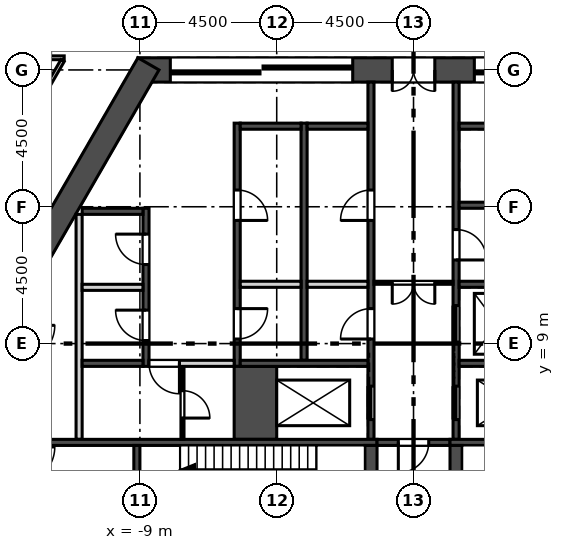
"""IFC4 building model, lengths in metres.
Left out: names, types, materials, properties, quantities, classifications, styles, units other than length and angle.
Written with IfcOpenShell. Run it as: python <this file> out.ifc"""

import sys

from ifc_helpers import new_model, si_unit, direction, frame, frame_2d, origin, place, context, subcontext, project, spatial, rectangle, extrude, element, fill, save


model = new_model("IFC4")
c1 = context("Model", 3, precision=1e-05, world=origin(), true_north=direction((0.0, 1.0)))
c2 = subcontext(c1, "Body", "Model", "MODEL_VIEW")
j1 = project(units=[si_unit("LENGTHUNIT", "METRE"), si_unit("PLANEANGLEUNIT", "RADIAN")], contexts=[c1])
p1 = place(None, origin())
s1 = spatial("IfcSite", under=j1, at=p1, CompositionType="ELEMENT")
p2 = place(p1, origin())
s2 = spatial("IfcBuilding", under=s1, at=p2, CompositionType="ELEMENT")
p3 = place(p2, frame((0.0, 0.0, 339.3)))
s3 = spatial("IfcBuildingStorey", under=s2, at=p3, CompositionType="ELEMENT", Elevation=339.3)
p4 = place(p3, frame((9.065, 18.0, 0.0), z_axis=(0.0, 0.0, 1.0), x_axis=(-1.0, 0.0, 0.0)))
e1 = element("IfcWall", 1, at=p4, inside=s3, PredefinedType="SHEAR", context=c2, shape_type="SweptSolid", body=[
    extrude(rectangle(XDim=18.13, YDim=0.8, at=frame_2d((9.065, 0.0))), origin(), (0.0, 0.0, 1.0), 5.4),
])
p5 = place(p4, frame((8.365, 0.0, 0.0)))
e2 = element("IfcOpeningElement", 2, at=p5, cuts=e1, PredefinedType="OPENING", context=c2, shape_type="SweptSolid", body=[
    extrude(rectangle(XDim=1.4, YDim=2.1, at=frame_2d((0.7, 1.05))), frame((0.0, 0.41, 0.0), z_axis=(0.0, -1.0, 0.0), x_axis=(1.0, 0.0, 0.0)), (0.0, 0.0, 1.0), 0.82),
])
p6 = place(p4, frame((11.065, 0.0, 0.0)))
e3 = element("IfcOpeningElement", 3, at=p6, cuts=e1, PredefinedType="OPENING", context=c2, shape_type="SweptSolid", body=[
    extrude(rectangle(XDim=6.0, YDim=2.4, at=frame_2d((3.0, 1.2))), frame((0.0, 0.41, 0.0), z_axis=(0.0, -1.0, 0.0), x_axis=(1.0, 0.0, 0.0)), (0.0, 0.0, 1.0), 0.82),
])
p7 = place(p4, frame((1.065, 0.0, 0.0)))
e4 = element("IfcOpeningElement", 4, at=p7, cuts=e1, PredefinedType="OPENING", context=c2, shape_type="SweptSolid", body=[
    extrude(rectangle(XDim=6.0, YDim=2.4, at=frame_2d((3.0, 1.2))), frame((0.0, 0.41, 0.0), z_axis=(0.0, -1.0, 0.0), x_axis=(1.0, 0.0, 0.0)), (0.0, 0.0, 1.0), 0.82),
])
p8 = place(p3, frame((-8.719, 18.2, 0.0), z_axis=(0.0, 0.0, 1.0), x_axis=(-0.500015780397, -0.866016292776, 0.0)))
e5 = element("IfcWall", 5, at=p8, inside=s3, PredefinedType="SHEAR", context=c2, shape_type="SweptSolid", body=[
    extrude(rectangle(XDim=8.67, YDim=0.8, at=frame_2d((4.335, 0.0))), origin(), (0.0, 0.0, 1.0), 5.4),
])
p9 = place(p3, frame((-11.0, 5.85, 0.0), z_axis=(0.0, 0.0, 1.0), x_axis=(0.0, 1.0, 0.0)))
e6 = element("IfcWall", 6, at=p9, inside=s3, PredefinedType="SOLIDWALL", context=c2, shape_type="SweptSolid", body=[
    extrude(rectangle(XDim=7.4, YDim=0.2, at=frame_2d((3.7, 0.0))), origin(), (0.0, 0.0, 1.0), 4.6),
])
p10 = place(p3, frame((-8.8, 8.25, -0.4), z_axis=(0.0, 0.0, 1.0), x_axis=(0.0, 1.0, 0.0)))
e7 = element("IfcWall", 7, at=p10, inside=s3, PredefinedType="SOLIDWALL", context=c2, shape_type="SweptSolid", body=[
    extrude(rectangle(XDim=5.2, YDim=0.2, at=frame_2d((2.6, 0.0))), origin(), (0.0, 0.0, 1.0), 5.0),
])
p11 = place(p10, frame((0.85, 0.0, 0.4)))
e8 = element("IfcOpeningElement", 8, at=p11, cuts=e7, PredefinedType="OPENING", context=c2, shape_type="SweptSolid", body=[
    extrude(rectangle(XDim=1.0, YDim=2.1, at=frame_2d((0.5, 1.05))), frame((0.0, 0.11, 0.0), z_axis=(0.0, -1.0, 0.0), x_axis=(1.0, 0.0, 0.0)), (0.0, 0.0, 1.0), 0.22),
])
p12 = place(p10, frame((3.35, 0.0, 0.4)))
e9 = element("IfcOpeningElement", 9, at=p12, cuts=e7, PredefinedType="OPENING", context=c2, shape_type="SweptSolid", body=[
    extrude(rectangle(XDim=1.0, YDim=2.1, at=frame_2d((0.5, 1.05))), frame((0.0, 0.11, 0.0), z_axis=(0.0, -1.0, 0.0), x_axis=(1.0, 0.0, 0.0)), (0.0, 0.0, 1.0), 0.22),
])
p13 = place(p3, frame((-5.8, 8.25, -0.4), z_axis=(0.0, 0.0, 1.0), x_axis=(0.0, 1.0, 0.0)))
e10 = element("IfcWall", 10, at=p13, inside=s3, PredefinedType="SOLIDWALL", context=c2, shape_type="SweptSolid", body=[
    extrude(rectangle(XDim=8.0, YDim=0.2, at=frame_2d((4.0, 0.0))), origin(), (0.0, 0.0, 1.0), 5.0),
])
p14 = place(p13, frame((0.9, 0.0, 0.4)))
e11 = element("IfcOpeningElement", 11, at=p14, cuts=e10, PredefinedType="OPENING", context=c2, shape_type="SweptSolid", body=[
    extrude(rectangle(XDim=1.0, YDim=2.1, at=frame_2d((0.5, 1.05))), frame((0.0, 0.11, 0.0), z_axis=(0.0, -1.0, 0.0), x_axis=(1.0, 0.0, 0.0)), (0.0, 0.0, 1.0), 0.22),
])
p15 = place(p13, frame((4.8, 0.0, 0.4)))
e12 = element("IfcOpeningElement", 12, at=p15, cuts=e10, PredefinedType="OPENING", context=c2, shape_type="SweptSolid", body=[
    extrude(rectangle(XDim=1.0, YDim=2.1, at=frame_2d((0.5, 1.05))), frame((0.0, 0.11, 0.0), z_axis=(0.0, -1.0, 0.0), x_axis=(1.0, 0.0, 0.0)), (0.0, 0.0, 1.0), 0.22),
])
p16 = place(p3, frame((-3.6, 8.45, -0.4), z_axis=(0.0, 0.0, 1.0), x_axis=(0.0, 1.0, 0.0)))
e13 = element("IfcWall", 13, at=p16, inside=s3, PredefinedType="SOLIDWALL", context=c2, shape_type="SweptSolid", body=[
    extrude(rectangle(XDim=7.8, YDim=0.2, at=frame_2d((3.9, 0.0))), origin(), (0.0, 0.0, 1.0), 5.0),
])
p17 = place(p3, frame((-1.4, 5.85, -0.4), z_axis=(0.0, 0.0, 1.0), x_axis=(0.0, 1.0, 0.0)))
e14 = element("IfcWall", 14, at=p17, inside=s3, PredefinedType="SOLIDWALL", context=c2, shape_type="SweptSolid", body=[
    extrude(rectangle(XDim=11.75, YDim=0.2, at=frame_2d((5.875, 0.0))), origin(), (0.0, 0.0, 1.0), 5.0),
])
p18 = place(p17, frame((0.65, 0.0, 0.4)))
e15 = element("IfcOpeningElement", 15, at=p18, cuts=e14, PredefinedType="OPENING", context=c2, shape_type="SweptSolid", body=[
    extrude(rectangle(XDim=1.1, YDim=2.1, at=frame_2d((0.55, 1.05))), frame((0.0, 0.11, 0.0), z_axis=(0.0, -1.0, 0.0), x_axis=(1.0, 0.0, 0.0)), (0.0, 0.0, 1.0), 0.22),
])
p19 = place(p17, frame((3.3, 0.0, 0.4)))
e16 = element("IfcOpeningElement", 16, at=p19, cuts=e14, PredefinedType="OPENING", context=c2, shape_type="SweptSolid", body=[
    extrude(rectangle(XDim=1.0, YDim=2.1, at=frame_2d((0.5, 1.05))), frame((0.0, 0.11, 0.0), z_axis=(0.0, -1.0, 0.0), x_axis=(1.0, 0.0, 0.0)), (0.0, 0.0, 1.0), 0.22),
])
p20 = place(p17, frame((7.2, 0.0, 0.4)))
e17 = element("IfcOpeningElement", 17, at=p20, cuts=e14, PredefinedType="OPENING", context=c2, shape_type="SweptSolid", body=[
    extrude(rectangle(XDim=1.0, YDim=2.1, at=frame_2d((0.5, 1.05))), frame((0.0, 0.11, 0.0), z_axis=(0.0, -1.0, 0.0), x_axis=(1.0, 0.0, 0.0)), (0.0, 0.0, 1.0), 0.22),
])
p21 = place(p3, frame((1.4, 5.85, -0.4), z_axis=(0.0, 0.0, 1.0), x_axis=(0.0, 1.0, 0.0)))
e18 = element("IfcWall", 18, at=p21, inside=s3, PredefinedType="SOLIDWALL", context=c2, shape_type="SweptSolid", body=[
    extrude(rectangle(XDim=11.75, YDim=0.2, at=frame_2d((5.875, 0.0))), origin(), (0.0, 0.0, 1.0), 5.0),
])
p22 = place(p21, frame((3.2, 0.0, 0.4)))
e19 = element("IfcOpeningElement", 19, at=p22, cuts=e18, PredefinedType="OPENING", context=c2, shape_type="SweptSolid", body=[
    extrude(rectangle(XDim=1.2, YDim=2.1, at=frame_2d((0.6, 1.05))), frame((0.0, 0.11, 0.0), z_axis=(0.0, -1.0, 0.0), x_axis=(1.0, 0.0, 0.0)), (0.0, 0.0, 1.0), 0.22),
])
p23 = place(p21, frame((0.65, 0.0, 0.4)))
e20 = element("IfcOpeningElement", 20, at=p23, cuts=e18, PredefinedType="OPENING", context=c2, shape_type="SweptSolid", body=[
    extrude(rectangle(XDim=1.1, YDim=2.1, at=frame_2d((0.55, 1.05))), frame((0.0, 0.11, 0.0), z_axis=(0.0, -1.0, 0.0), x_axis=(1.0, 0.0, 0.0)), (0.0, 0.0, 1.0), 0.22),
])
p24 = place(p21, frame((5.9, 0.0, 0.4)))
e21 = element("IfcOpeningElement", 21, at=p24, cuts=e18, PredefinedType="OPENING", context=c2, shape_type="SweptSolid", body=[
    extrude(rectangle(XDim=1.0, YDim=2.1, at=frame_2d((0.5, 1.05))), frame((0.0, 0.11, 0.0), z_axis=(0.0, -1.0, 0.0), x_axis=(1.0, 0.0, 0.0)), (0.0, 0.0, 1.0), 0.22),
])
p25 = place(p3, frame((-5.2, 5.85, -0.4), z_axis=(0.0, 0.0, 1.0), x_axis=(0.0, 1.0, 0.0)))
e22 = element("IfcWall", 22, at=p25, inside=s3, PredefinedType="SOLIDWALL", context=c2, shape_type="SweptSolid", body=[
    extrude(rectangle(XDim=2.4, YDim=1.4, at=frame_2d((1.2, 0.0))), origin(), (0.0, 0.0, 1.0), 5.0),
])
p26 = place(p3, frame((-10.9, 8.35, -0.4), z_axis=(0.0, 0.0, 1.0), x_axis=(1.0, 0.0, 0.0)))
e23 = element("IfcWall", 23, at=p26, inside=s3, PredefinedType="SOLIDWALL", context=c2, shape_type="SweptSolid", body=[
    extrude(rectangle(XDim=2.0, YDim=0.2, at=frame_2d((1.0, 0.0))), origin(), (0.0, 0.0, 1.0), 5.0),
])
for number, where, z_axis, x_axis in (
    (24, (-5.7, 8.35, -0.4), (0.0, 0.0, 1.0), (1.0, 0.0, 0.0)),
    (25, (1.5, 8.35, -0.4), (0.0, 0.0, 1.0), (1.0, 0.0, 0.0)),
):
    element("IfcWall", number, at=place(p3, frame(where, z_axis=z_axis, x_axis=x_axis)), inside=s3, PredefinedType="SOLIDWALL", context=c2, shape_type="SweptSolid", body=[
        extrude(rectangle(XDim=4.2, YDim=0.2, at=frame_2d((2.1, 0.0))), origin(), (0.0, 0.0, 1.0), 5.0),
    ])
p27 = place(p3, frame((-12.6, 5.75, -0.4), z_axis=(0.0, 0.0, 1.0), x_axis=(1.0, 0.0, 0.0)))
e26 = element("IfcWall", 26, at=p27, inside=s3, PredefinedType="SOLIDWALL", context=c2, shape_type="SweptSolid", body=[
    extrude(rectangle(XDim=11.4, YDim=0.2, at=frame_2d((5.7, 0.0))), origin(), (0.0, 0.0, 1.0), 5.0),
])
p28 = place(p3, frame((-1.2, 5.75, -0.4), z_axis=(0.0, 0.0, 1.0), x_axis=(1.0, 0.0, 0.0)))
e27 = element("IfcWall", 27, at=p28, inside=s3, PredefinedType="SOLIDWALL", context=c2, shape_type="SweptSolid", body=[
    extrude(rectangle(XDim=2.4, YDim=0.2, at=frame_2d((1.2, 0.0))), origin(), (0.0, 0.0, 1.0), 5.0),
])
p29 = place(p28, frame((0.7, 0.0, 0.4)))
e28 = element("IfcOpeningElement", 28, at=p29, cuts=e27, PredefinedType="OPENING", context=c2, shape_type="SweptSolid", body=[
    extrude(rectangle(XDim=1.0, YDim=2.1, at=frame_2d((0.5, 1.05))), frame((0.0, 0.11, 0.0), z_axis=(0.0, -1.0, 0.0), x_axis=(1.0, 0.0, 0.0)), (0.0, 0.0, 1.0), 0.22),
])
p30 = place(p3, frame((1.2, 5.75, -0.4), z_axis=(0.0, 0.0, 1.0), x_axis=(1.0, 0.0, 0.0)))
e29 = element("IfcWall", 29, at=p30, inside=s3, PredefinedType="SOLIDWALL", context=c2, shape_type="SweptSolid", body=[
    extrude(rectangle(XDim=11.4, YDim=0.2, at=frame_2d((5.7, 0.0))), origin(), (0.0, 0.0, 1.0), 5.0),
])
p31 = place(p3, frame((-9.1, 2.25, -0.4), z_axis=(0.0, 0.0, 1.0), x_axis=(0.0, 1.0, 0.0)))
e30 = element("IfcWall", 30, at=p31, inside=s3, PredefinedType="SOLIDWALL", context=c2, shape_type="SweptSolid", body=[
    extrude(rectangle(XDim=3.4, YDim=0.2, at=frame_2d((1.7, 0.0))), origin(), (0.0, 0.0, 1.0), 5.0),
])
p32 = place(p31, frame((0.2, 0.0, 0.4)))
e31 = element("IfcOpeningElement", 31, at=p32, cuts=e30, PredefinedType="OPENING", context=c2, shape_type="SweptSolid", body=[
    extrude(rectangle(XDim=1.2, YDim=2.1, at=frame_2d((0.6, 1.05))), frame((0.0, 0.11, 0.0), z_axis=(0.0, -1.0, 0.0), x_axis=(1.0, 0.0, 0.0)), (0.0, 0.0, 1.0), 0.22),
])
for number, where, z_axis, x_axis in (
    (32, (-1.4, 2.25, -0.4), (0.0, 0.0, 1.0), (0.0, 1.0, 0.0)),
    (33, (1.4, 2.25, -0.4), (0.0, 0.0, 1.0), (0.0, 1.0, 0.0)),
):
    element("IfcWall", number, at=place(p3, frame(where, z_axis=z_axis, x_axis=x_axis)), inside=s3, PredefinedType="SOLIDWALL", context=c2, shape_type="SweptSolid", body=[
        extrude(rectangle(XDim=3.4, YDim=0.4, at=frame_2d((1.7, 0.0))), origin(), (0.0, 0.0, 1.0), 5.0),
    ])
p33 = place(p3, frame((-10.9, 10.85, 0.0), z_axis=(0.0, 0.0, 1.0), x_axis=(1.0, 0.0, 0.0)))
e34 = element("IfcWall", 34, at=p33, inside=s3, PredefinedType="SOLIDWALL", context=c2, shape_type="SweptSolid", body=[
    extrude(rectangle(XDim=2.0, YDim=0.2, at=frame_2d((1.0, 0.0))), origin(), (0.0, 0.0, 1.0), 4.6),
])
p34 = place(p3, frame((-10.9, 13.35, -0.4), z_axis=(0.0, 0.0, 1.0), x_axis=(1.0, 0.0, 0.0)))
e35 = element("IfcWall", 35, at=p34, inside=s3, PredefinedType="SOLIDWALL", context=c2, shape_type="SweptSolid", body=[
    extrude(rectangle(XDim=2.0, YDim=0.2, at=frame_2d((1.0, 0.0))), origin(), (0.0, 0.0, 1.0), 5.0),
])
p35 = place(p3, frame((-5.7, 10.95, 0.0), z_axis=(0.0, 0.0, 1.0), x_axis=(1.0, 0.0, 0.0)))
e36 = element("IfcWall", 36, at=p35, inside=s3, PredefinedType="SOLIDWALL", context=c2, shape_type="SweptSolid", body=[
    extrude(rectangle(XDim=2.0, YDim=0.2, at=frame_2d((1.0, 0.0))), origin(), (0.0, 0.0, 1.0), 4.6),
])
p36 = place(p3, frame((-5.7, 16.15, -0.4), z_axis=(0.0, 0.0, 1.0), x_axis=(1.0, 0.0, 0.0)))
e37 = element("IfcWall", 37, at=p36, inside=s3, PredefinedType="SOLIDWALL", context=c2, shape_type="SweptSolid", body=[
    extrude(rectangle(XDim=2.0, YDim=0.2, at=frame_2d((1.0, 0.0))), origin(), (0.0, 0.0, 1.0), 5.0),
])
p37 = place(p3, frame((-3.5, 10.95, 0.0), z_axis=(0.0, 0.0, 1.0), x_axis=(1.0, 0.0, 0.0)))
e38 = element("IfcWall", 38, at=p37, inside=s3, PredefinedType="SOLIDWALL", context=c2, shape_type="SweptSolid", body=[
    extrude(rectangle(XDim=2.0, YDim=0.2, at=frame_2d((1.0, 0.0))), origin(), (0.0, 0.0, 1.0), 4.6),
])
for number, where, z_axis, x_axis in (
    (39, (-3.5, 16.15, -0.4), (0.0, 0.0, 1.0), (1.0, 0.0, 0.0)),
    (40, (1.5, 10.95, -0.4), (0.0, 0.0, 1.0), (1.0, 0.0, 0.0)),
    (41, (1.5, 13.55, -0.4), (0.0, 0.0, 1.0), (1.0, 0.0, 0.0)),
    (42, (1.5, 16.15, -0.4), (0.0, 0.0, 1.0), (1.0, 0.0, 0.0)),
):
    element("IfcWall", number, at=place(p3, frame(where, z_axis=z_axis, x_axis=x_axis)), inside=s3, PredefinedType="SOLIDWALL", context=c2, shape_type="SweptSolid", body=[
        extrude(rectangle(XDim=2.0, YDim=0.2, at=frame_2d((1.0, 0.0))), origin(), (0.0, 0.0, 1.0), 5.0),
    ])
p38 = place(p3, frame((-7.6, 5.85, 0.0), z_axis=(0.0, 0.0, 1.0), x_axis=(0.0, 1.0, 0.0)))
e43 = element("IfcWall", 43, at=p38, inside=s3, PredefinedType="PARTITIONING", context=c2, shape_type="SweptSolid", body=[
    extrude(rectangle(XDim=2.4, YDim=0.1, at=frame_2d((1.2, 0.0))), origin(), (0.0, 0.0, 1.0), 4.6),
])
p39 = place(p38, frame((0.7, 0.0, 0.0)))
e44 = element("IfcOpeningElement", 44, at=p39, cuts=e43, PredefinedType="OPENING", context=c2, shape_type="SweptSolid", body=[
    extrude(rectangle(XDim=0.9, YDim=2.1, at=frame_2d((0.45, 1.05))), frame((0.0, 0.06, 0.0), z_axis=(0.0, -1.0, 0.0), x_axis=(1.0, 0.0, 0.0)), (0.0, 0.0, 1.0), 0.12),
])
p40 = place(p3, frame((-8.7, 8.35, 0.0), z_axis=(0.0, 0.0, 1.0), x_axis=(1.0, 0.0, 0.0)))
e45 = element("IfcWall", 45, at=p40, inside=s3, PredefinedType="SOLIDWALL", context=c2, shape_type="SweptSolid", body=[
    extrude(rectangle(XDim=2.8, YDim=0.2, at=frame_2d((1.4, 0.0))), origin(), (0.0, 0.0, 1.0), 4.6),
])
p41 = place(p40, origin())
e46 = element("IfcOpeningElement", 46, at=p41, cuts=e45, PredefinedType="OPENING", context=c2, shape_type="SweptSolid", body=[
    extrude(rectangle(XDim=1.0, YDim=2.1, at=frame_2d((0.5, 1.05))), frame((0.0, 0.11, 0.0), z_axis=(0.0, -1.0, 0.0), x_axis=(1.0, 0.0, 0.0)), (0.0, 0.0, 1.0), 0.22),
])
p42 = place(p3, frame((-1.3, 11.0, 0.0), z_axis=(0.0, 0.0, 1.0), x_axis=(1.0, 0.0, 0.0)))
e47 = element("IfcWall", 47, at=p42, inside=s3, PredefinedType="PARTITIONING", context=c2, shape_type="SweptSolid", body=[
    extrude(rectangle(XDim=2.6, YDim=0.1, at=frame_2d((1.3, 0.0))), origin(), (0.0, 0.0, 1.0), 4.6),
])
p43 = place(p42, frame((0.6, 0.0, 0.0)))
e48 = element("IfcOpeningElement", 48, at=p43, cuts=e47, PredefinedType="OPENING", context=c2, shape_type="SweptSolid", body=[
    extrude(rectangle(XDim=1.4, YDim=2.1, at=frame_2d((0.7, 1.05))), frame((0.0, 0.06, 0.0), z_axis=(0.0, -1.0, 0.0), x_axis=(1.0, 0.0, 0.0)), (0.0, 0.0, 1.0), 0.12),
])
p44 = place(p3, frame((-11.49, 18.4, 0.0), z_axis=(0.0, 0.0, 1.0), x_axis=(-1.0, 0.0, 0.0)))
e49 = element("IfcWall", 49, at=p44, inside=s3, PredefinedType="PARTITIONING", context=c2, shape_type="SweptSolid", body=[
    extrude(rectangle(XDim=0.51, YDim=0.125, at=frame_2d((0.255, 0.0))), origin(), (0.0, 0.0, 1.0), 4.6),
])
p45 = place(p3, frame((-13.306, 15.254, 0.0), z_axis=(0.0, 0.0, 1.0), x_axis=(0.499984357326, 0.866034434898, 0.0)))
e50 = element("IfcWall", 50, at=p45, inside=s3, PredefinedType="PARTITIONING", context=c2, shape_type="SweptSolid", body=[
    extrude(rectangle(XDim=3.523, YDim=0.125, at=frame_2d((1.762, 0.0))), origin(), (0.0, 0.0, 1.0), 4.6),
])
p46 = place(p18, origin())
e51 = element("IfcDoor", 51, at=p46, inside=s3, OperationType="SLIDING_TO_RIGHT", PredefinedType="DOOR", context=c2, shape_type="SweptSolid", body=[
    extrude(rectangle(XDim=1.1, YDim=2.1, at=frame_2d((0.55, 1.05))), frame((0.0, 0.025, 0.0), z_axis=(0.0, -1.0, 0.0), x_axis=(1.0, 0.0, 0.0)), (0.0, 0.0, 1.0), 0.05),
])
fill(e15, e51)
p47 = place(p22, origin())
e52 = element("IfcDoor", 52, at=p47, inside=s3, OperationType="SLIDING_TO_LEFT", PredefinedType="DOOR", context=c2, shape_type="SweptSolid", body=[
    extrude(rectangle(XDim=1.2, YDim=2.1, at=frame_2d((0.6, 1.05))), frame((0.0, 0.025, 0.0), z_axis=(0.0, -1.0, 0.0), x_axis=(1.0, 0.0, 0.0)), (0.0, 0.0, 1.0), 0.05),
])
fill(e19, e52)
p48 = place(p23, origin())
e53 = element("IfcDoor", 53, at=p48, inside=s3, OperationType="SLIDING_TO_RIGHT", PredefinedType="DOOR", context=c2, shape_type="SweptSolid", body=[
    extrude(rectangle(XDim=1.1, YDim=2.1, at=frame_2d((0.55, 1.05))), frame((0.0, 0.025, 0.0), z_axis=(0.0, -1.0, 0.0), x_axis=(1.0, 0.0, 0.0)), (0.0, 0.0, 1.0), 0.05),
])
fill(e20, e53)
p49 = place(p11, origin())
e54 = element("IfcDoor", 54, at=p49, inside=s3, OperationType="SINGLE_SWING_RIGHT", PredefinedType="DOOR", context=c2, shape_type="SweptSolid", body=[
    extrude(rectangle(XDim=1.0, YDim=2.1, at=frame_2d((0.5, 1.05))), frame((0.0, 0.025, 0.0), z_axis=(0.0, -1.0, 0.0), x_axis=(1.0, 0.0, 0.0)), (0.0, 0.0, 1.0), 0.05),
])
fill(e8, e54)
p50 = place(p12, origin())
e55 = element("IfcDoor", 55, at=p50, inside=s3, OperationType="SINGLE_SWING_RIGHT", PredefinedType="DOOR", context=c2, shape_type="SweptSolid", body=[
    extrude(rectangle(XDim=1.0, YDim=2.1, at=frame_2d((0.5, 1.05))), frame((0.0, 0.025, 0.0), z_axis=(0.0, -1.0, 0.0), x_axis=(1.0, 0.0, 0.0)), (0.0, 0.0, 1.0), 0.05),
])
fill(e9, e55)
p51 = place(p14, frame((1.0, 0.0, 0.0), z_axis=(0.0, 0.0, 1.0), x_axis=(-1.0, 0.0, 0.0)))
e56 = element("IfcDoor", 56, at=p51, inside=s3, OperationType="SINGLE_SWING_LEFT", PredefinedType="DOOR", context=c2, shape_type="SweptSolid", body=[
    extrude(rectangle(XDim=1.0, YDim=2.1, at=frame_2d((0.5, 1.05))), frame((0.0, 0.025, 0.0), z_axis=(0.0, -1.0, 0.0), x_axis=(1.0, 0.0, 0.0)), (0.0, 0.0, 1.0), 0.05),
])
fill(e11, e56)
p52 = place(p15, frame((1.0, 0.0, 0.0), z_axis=(0.0, 0.0, 1.0), x_axis=(-1.0, 0.0, 0.0)))
e57 = element("IfcDoor", 57, at=p52, inside=s3, OperationType="SINGLE_SWING_RIGHT", PredefinedType="DOOR", context=c2, shape_type="SweptSolid", body=[
    extrude(rectangle(XDim=1.0, YDim=2.1, at=frame_2d((0.5, 1.05))), frame((0.0, 0.025, 0.0), z_axis=(0.0, -1.0, 0.0), x_axis=(1.0, 0.0, 0.0)), (0.0, 0.0, 1.0), 0.05),
])
fill(e12, e57)
p53 = place(p19, origin())
e58 = element("IfcDoor", 58, at=p53, inside=s3, OperationType="SINGLE_SWING_LEFT", PredefinedType="DOOR", context=c2, shape_type="SweptSolid", body=[
    extrude(rectangle(XDim=1.0, YDim=2.1, at=frame_2d((0.5, 1.05))), frame((0.0, 0.025, 0.0), z_axis=(0.0, -1.0, 0.0), x_axis=(1.0, 0.0, 0.0)), (0.0, 0.0, 1.0), 0.05),
])
fill(e16, e58)
p54 = place(p20, origin())
e59 = element("IfcDoor", 59, at=p54, inside=s3, OperationType="SINGLE_SWING_LEFT", PredefinedType="DOOR", context=c2, shape_type="SweptSolid", body=[
    extrude(rectangle(XDim=1.0, YDim=2.1, at=frame_2d((0.5, 1.05))), frame((0.0, 0.025, 0.0), z_axis=(0.0, -1.0, 0.0), x_axis=(1.0, 0.0, 0.0)), (0.0, 0.0, 1.0), 0.05),
])
fill(e17, e59)
p55 = place(p24, frame((1.0, 0.0, 0.0), z_axis=(0.0, 0.0, 1.0), x_axis=(-1.0, 0.0, 0.0)))
e60 = element("IfcDoor", 60, at=p55, inside=s3, OperationType="SINGLE_SWING_RIGHT", PredefinedType="DOOR", context=c2, shape_type="SweptSolid", body=[
    extrude(rectangle(XDim=1.0, YDim=2.1, at=frame_2d((0.5, 1.05))), frame((0.0, 0.025, 0.0), z_axis=(0.0, -1.0, 0.0), x_axis=(1.0, 0.0, 0.0)), (0.0, 0.0, 1.0), 0.05),
])
fill(e21, e60)
p56 = place(p29, frame((1.0, 0.0, 0.0), z_axis=(0.0, 0.0, 1.0), x_axis=(-1.0, 0.0, 0.0)))
e61 = element("IfcDoor", 61, at=p56, inside=s3, OperationType="SINGLE_SWING_RIGHT", PredefinedType="DOOR", context=c2, shape_type="SweptSolid", body=[
    extrude(rectangle(XDim=1.0, YDim=2.1, at=frame_2d((0.5, 1.05))), frame((0.0, 0.025, 0.0), z_axis=(0.0, -1.0, 0.0), x_axis=(1.0, 0.0, 0.0)), (0.0, 0.0, 1.0), 0.05),
])
fill(e28, e61)
p57 = place(p41, frame((1.0, 0.0, 0.0), z_axis=(0.0, 0.0, 1.0), x_axis=(-1.0, 0.0, 0.0)))
e62 = element("IfcDoor", 62, at=p57, inside=s3, OperationType="SINGLE_SWING_LEFT", PredefinedType="DOOR", context=c2, shape_type="SweptSolid", body=[
    extrude(rectangle(XDim=1.0, YDim=2.1, at=frame_2d((0.5, 1.05))), frame((0.0, 0.025, 0.0), z_axis=(0.0, -1.0, 0.0), x_axis=(1.0, 0.0, 0.0)), (0.0, 0.0, 1.0), 0.05),
])
fill(e46, e62)
p58 = place(p39, frame((0.9, 0.0, 0.0), z_axis=(0.0, 0.0, 1.0), x_axis=(-1.0, 0.0, 0.0)))
e63 = element("IfcDoor", 63, at=p58, inside=s3, OperationType="SINGLE_SWING_RIGHT", PredefinedType="DOOR", context=c2, shape_type="SweptSolid", body=[
    extrude(rectangle(XDim=0.9, YDim=2.1, at=frame_2d((0.45, 1.05))), frame((0.0, 0.025, 0.0), z_axis=(0.0, -1.0, 0.0), x_axis=(1.0, 0.0, 0.0)), (0.0, 0.0, 1.0), 0.05),
])
fill(e44, e63)
p59 = place(p43, frame((1.4, 0.0, 0.0), z_axis=(0.0, 0.0, 1.0), x_axis=(-1.0, 0.0, 0.0)))
e64 = element("IfcDoor", 64, at=p59, inside=s3, OperationType="DOUBLE_DOOR_SINGLE_SWING", PredefinedType="DOOR", context=c2, shape_type="SweptSolid", body=[
    extrude(rectangle(XDim=1.4, YDim=2.1, at=frame_2d((0.7, 1.05))), frame((0.0, 0.025, 0.0), z_axis=(0.0, -1.0, 0.0), x_axis=(1.0, 0.0, 0.0)), (0.0, 0.0, 1.0), 0.05),
])
fill(e48, e64)
p60 = place(p5, origin())
e65 = element("IfcDoor", 65, at=p60, inside=s3, OperationType="DOUBLE_DOOR_SINGLE_SWING", PredefinedType="DOOR", context=c2, shape_type="SweptSolid", body=[
    extrude(rectangle(XDim=1.4, YDim=2.1, at=frame_2d((0.7, 1.05))), frame((0.0, 0.025, 0.0), z_axis=(0.0, -1.0, 0.0), x_axis=(1.0, 0.0, 0.0)), (0.0, 0.0, 1.0), 0.05),
])
fill(e2, e65)
p61 = place(p6, origin())
e66 = element("IfcDoor", 66, at=p61, inside=s3, OperationType="DOUBLE_DOOR_SLIDING", PredefinedType="DOOR", context=c2, shape_type="SweptSolid", body=[
    extrude(rectangle(XDim=6.0, YDim=2.4, at=frame_2d((3.0, 1.2))), frame((0.0, 0.025, 0.0), z_axis=(0.0, -1.0, 0.0), x_axis=(1.0, 0.0, 0.0)), (0.0, 0.0, 1.0), 0.05),
])
fill(e3, e66)
p62 = place(p7, origin())
e67 = element("IfcDoor", 67, at=p62, inside=s3, OperationType="DOUBLE_DOOR_SLIDING", PredefinedType="DOOR", context=c2, shape_type="SweptSolid", body=[
    extrude(rectangle(XDim=6.0, YDim=2.4, at=frame_2d((3.0, 1.2))), frame((0.0, 0.025, 0.0), z_axis=(0.0, -1.0, 0.0), x_axis=(1.0, 0.0, 0.0)), (0.0, 0.0, 1.0), 0.05),
])
fill(e4, e67)
save(model, sys.argv[1])
